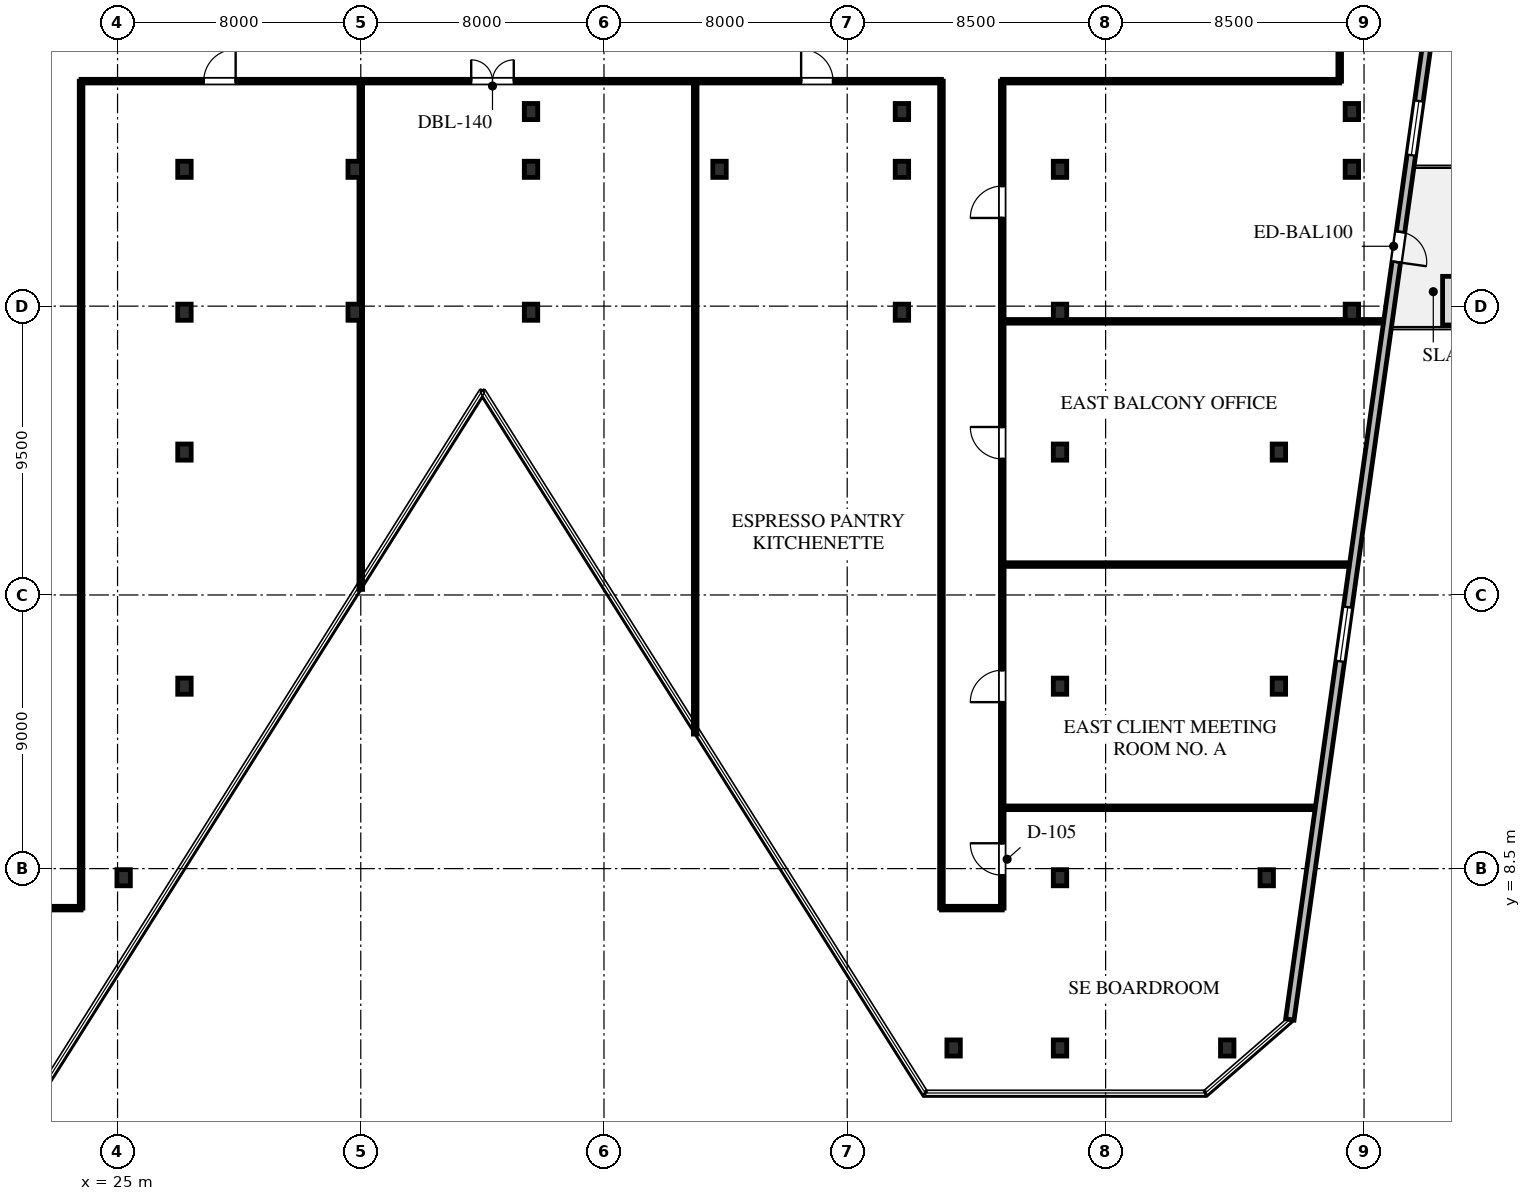
"""IFC4 building model, lengths in metres.
Left out: names, types, materials, properties, quantities, classifications, styles, units other than length and angle.
Written with IfcOpenShell. Run it as: python <this file> out.ifc"""

import sys

from ifc_helpers import new_model, si_unit, direction, frame, frame_2d, origin, origin_2d, place, context, subcontext, project, spatial, rectangle, i_section, extrude, element, fill, save


model = new_model("IFC4")
c1 = context("Model", 3, precision=1e-05, world=origin(), true_north=direction((0.0, 1.0)))
c2 = subcontext(c1, "Body", "Model", "MODEL_VIEW")
j1 = project(units=[si_unit("LENGTHUNIT", "METRE"), si_unit("PLANEANGLEUNIT", "RADIAN")], contexts=[c1])
p1 = place(None, origin())
s1 = spatial("IfcSite", under=j1, at=p1, CompositionType="ELEMENT")
p2 = place(p1, origin())
s2 = spatial("IfcBuilding", under=s1, at=p2, CompositionType="ELEMENT")
p3 = place(p2, frame((0.0, 0.0, 37.5)))
s3 = spatial("IfcBuildingStorey", under=s2, at=p3, CompositionType="ELEMENT", Elevation=37.5)
for number, where, z_axis, x_axis in (
    (1, (56.0, 14.5, 0.0), (0.0, 0.0, 1.0), (1.0, 0.0, 0.0)),
    (2, (63.2, 14.5, 0.0), (0.0, 0.0, 1.0), (1.0, 0.0, 0.0)),
    (3, (27.2, 22.2, 0.0), (0.0, 0.0, 1.0), (1.0, 0.0, 0.0)),
    (4, (56.0, 22.2, 0.0), (0.0, 0.0, 1.0), (1.0, 0.0, 0.0)),
    (5, (63.2, 22.2, 0.0), (0.0, 0.0, 1.0), (1.0, 0.0, 0.0)),
    (6, (27.2, 26.8, 0.0), (0.0, 0.0, 1.0), (1.0, 0.0, 0.0)),
    (7, (32.8, 26.8, 0.0), (0.0, 0.0, 1.0), (1.0, 0.0, 0.0)),
    (8, (38.6, 26.8, 0.0), (0.0, 0.0, 1.0), (1.0, 0.0, 0.0)),
    (9, (50.8, 26.8, 0.0), (0.0, 0.0, 1.0), (1.0, 0.0, 0.0)),
    (10, (56.0, 26.8, 0.0), (0.0, 0.0, 1.0), (1.0, 0.0, 0.0)),
    (11, (65.6, 26.8, 0.0), (0.0, 0.0, 1.0), (1.0, 0.0, 0.0)),
    (12, (27.2, 31.5, 0.0), (0.0, 0.0, 1.0), (1.0, 0.0, 0.0)),
    (13, (32.8, 31.5, 0.0), (0.0, 0.0, 1.0), (1.0, 0.0, 0.0)),
    (14, (38.6, 31.5, 0.0), (0.0, 0.0, 1.0), (1.0, 0.0, 0.0)),
    (15, (44.8, 31.5, 0.0), (0.0, 0.0, 1.0), (1.0, 0.0, 0.0)),
    (16, (50.8, 31.5, 0.0), (0.0, 0.0, 1.0), (1.0, 0.0, 0.0)),
    (17, (56.0, 31.5, 0.0), (0.0, 0.0, 1.0), (1.0, 0.0, 0.0)),
    (18, (65.6, 31.5, 0.0), (0.0, 0.0, 1.0), (1.0, 0.0, 0.0)),
    (19, (52.5, 2.6, 0.0), (0.0, 0.0, 1.0), (1.0, 0.0, 0.0)),
    (20, (56.0, 2.6, 0.0), (0.0, 0.0, 1.0), (1.0, 0.0, 0.0)),
    (21, (61.5, 2.6, 0.0), (0.0, 0.0, 1.0), (1.0, 0.0, 0.0)),
    (22, (25.2, 8.2, 0.0), (0.0, 0.0, 1.0), (1.0, 0.0, 0.0)),
    (23, (56.0, 8.2, 0.0), (0.0, 0.0, 1.0), (1.0, 0.0, 0.0)),
    (24, (62.8, 8.2, 0.0), (0.0, 0.0, 1.0), (1.0, 0.0, 0.0)),
    (25, (27.2, 14.5, 0.0), (0.0, 0.0, 1.0), (1.0, 0.0, 0.0)),
    (26, (38.6, 33.4, 0.0), (0.0, 0.0, 1.0), (1.0, 0.0, 0.0)),
    (27, (50.8, 33.4, 0.0), (0.0, 0.0, 1.0), (1.0, 0.0, 0.0)),
    (28, (65.6, 33.4, 0.0), (0.0, 0.0, 1.0), (1.0, 0.0, 0.0)),
):
    element("IfcColumn", number, at=place(p3, frame(where, z_axis=z_axis, x_axis=x_axis)), inside=s3, PredefinedType="COLUMN", context=c2, shape_type="SweptSolid", body=[
        extrude(i_section(OverallWidth=0.442, OverallDepth=0.531, WebThickness=0.066, FlangeThickness=0.106, FilletRadius=0.03, at=origin_2d()), origin(), (0.0, 0.0, 1.0), 4.0),
    ])
p4 = place(p3, frame((68.375, 37.8, 0.0), z_axis=(0.0, 0.0, 1.0), x_axis=(-0.139174610616, -0.990267856572, 0.0)))
e29 = element("IfcWall", 29, at=p4, inside=s3, PredefinedType="STANDARD", context=c2, shape_type="SweptSolid", body=[
    extrude(rectangle(XDim=34.6, YDim=0.28, at=frame_2d((17.3, 0.0))), origin(), (0.0, 0.0, 1.0), 3.74),
])
p5 = place(p4, frame((8.44, 0.0, 0.0)))
e30 = element("IfcOpeningElement", 30, at=p5, cuts=e29, PredefinedType="OPENING", context=c2, shape_type="SweptSolid", body=[
    extrude(rectangle(XDim=1.0, YDim=2.15, at=frame_2d((0.5, 1.075))), frame((0.0, 0.15, 0.0), z_axis=(0.0, -1.0, 0.0), x_axis=(1.0, 0.0, 0.0)), (0.0, 0.0, 1.0), 0.3),
])
p6 = place(p4, frame((4.092, 0.0, 0.65)))
e31 = element("IfcOpeningElement", 31, at=p6, cuts=e29, PredefinedType="OPENING", context=c2, shape_type="SweptSolid", body=[
    extrude(rectangle(XDim=1.8, YDim=2.1, at=frame_2d((0.9, 1.05))), frame((0.0, 0.15, 0.0), z_axis=(0.0, -1.0, 0.0), x_axis=(1.0, 0.0, 0.0)), (0.0, 0.0, 1.0), 0.3),
])
p7 = place(p4, frame((20.903, 0.0, 0.65)))
e32 = element("IfcOpeningElement", 32, at=p7, cuts=e29, PredefinedType="OPENING", context=c2, shape_type="SweptSolid", body=[
    extrude(rectangle(XDim=1.8, YDim=2.1, at=frame_2d((0.9, 1.05))), frame((0.0, 0.15, 0.0), z_axis=(0.0, -1.0, 0.0), x_axis=(1.0, 0.0, 0.0)), (0.0, 0.0, 1.0), 0.3),
])
p8 = place(p3, frame((23.8, 34.4, 0.0), z_axis=(0.0, 0.0, 1.0), x_axis=(1.0, 0.0, 0.0)))
e33 = element("IfcWall", 33, at=p8, inside=s3, PredefinedType="PARTITIONING", context=c2, shape_type="SweptSolid", body=[
    extrude(rectangle(XDim=28.3, YDim=0.12, at=frame_2d((14.15, 0.0))), origin(), (0.0, 0.0, 1.0), 2.813),
])
p9 = place(p8, frame((4.035, 0.0, 0.0)))
e34 = element("IfcOpeningElement", 34, at=p9, cuts=e33, PredefinedType="OPENING", context=c2, shape_type="SweptSolid", body=[
    extrude(rectangle(XDim=1.05, YDim=2.2, at=frame_2d((0.525, 1.1))), frame((0.0, 0.07, 0.0), z_axis=(0.0, -1.0, 0.0), x_axis=(1.0, 0.0, 0.0)), (0.0, 0.0, 1.0), 0.14),
])
p10 = place(p8, frame((12.832, 0.0, 0.0)))
e35 = element("IfcOpeningElement", 35, at=p10, cuts=e33, PredefinedType="OPENING", context=c2, shape_type="SweptSolid", body=[
    extrude(rectangle(XDim=1.4, YDim=2.2, at=frame_2d((0.7, 1.1))), frame((0.0, 0.07, 0.0), z_axis=(0.0, -1.0, 0.0), x_axis=(1.0, 0.0, 0.0)), (0.0, 0.0, 1.0), 0.14),
])
p11 = place(p8, frame((23.685, 0.0, 0.0)))
e36 = element("IfcOpeningElement", 36, at=p11, cuts=e33, PredefinedType="OPENING", context=c2, shape_type="SweptSolid", body=[
    extrude(rectangle(XDim=1.05, YDim=2.2, at=frame_2d((0.525, 1.1))), frame((0.0, 0.07, 0.0), z_axis=(0.0, -1.0, 0.0), x_axis=(1.0, 0.0, 0.0)), (0.0, 0.0, 1.0), 0.14),
])
p12 = place(p3, frame((54.1, 34.4, 0.0), z_axis=(0.0, 0.0, 1.0), x_axis=(1.0, 0.0, 0.0)))
e37 = element("IfcWall", 37, at=p12, inside=s3, PredefinedType="PARTITIONING", context=c2, shape_type="SweptSolid", body=[
    extrude(rectangle(XDim=11.1, YDim=0.12, at=frame_2d((5.55, 0.0))), origin(), (0.0, 0.0, 1.0), 2.813),
])
p13 = place(p3, frame((65.2, 34.4, 0.0), z_axis=(0.0, 0.0, 1.0), x_axis=(0.0, 1.0, 0.0)))
e38 = element("IfcWall", 38, at=p13, inside=s3, PredefinedType="PARTITIONING", context=c2, shape_type="SweptSolid", body=[
    extrude(rectangle(XDim=3.217, YDim=0.12, at=frame_2d((1.608, 0.0))), origin(), (0.0, 0.0, 1.0), 2.813),
])
p14 = place(p3, frame((23.8, 7.2, 0.0), z_axis=(0.0, 0.0, 1.0), x_axis=(0.0, 1.0, 0.0)))
e39 = element("IfcWall", 39, at=p14, inside=s3, PredefinedType="PARTITIONING", context=c2, shape_type="SweptSolid", body=[
    extrude(rectangle(XDim=27.2, YDim=0.12, at=frame_2d((13.6, 0.0))), origin(), (0.0, 0.0, 1.0), 2.813),
])
p15 = place(p3, frame((21.8, 7.2, 0.0), z_axis=(0.0, 0.0, 1.0), x_axis=(1.0, 0.0, 0.0)))
e40 = element("IfcWall", 40, at=p15, inside=s3, PredefinedType="PARTITIONING", context=c2, shape_type="SweptSolid", body=[
    extrude(rectangle(XDim=2.0, YDim=0.12, at=frame_2d((1.0, 0.0))), origin(), (0.0, 0.0, 1.0), 2.978),
])
p16 = place(p3, frame((52.1, 7.2, 0.0), z_axis=(0.0, 0.0, 1.0), x_axis=(0.0, 1.0, 0.0)))
e41 = element("IfcWall", 41, at=p16, inside=s3, PredefinedType="PARTITIONING", context=c2, shape_type="SweptSolid", body=[
    extrude(rectangle(XDim=27.2, YDim=0.12, at=frame_2d((13.6, 0.0))), origin(), (0.0, 0.0, 1.0), 2.813),
])
p17 = place(p3, frame((54.1, 7.2, 0.0), z_axis=(0.0, 0.0, 1.0), x_axis=(0.0, 1.0, 0.0)))
e42 = element("IfcWall", 42, at=p17, inside=s3, PredefinedType="PARTITIONING", context=c2, shape_type="SweptSolid", body=[
    extrude(rectangle(XDim=27.2, YDim=0.12, at=frame_2d((13.6, 0.0))), origin(), (0.0, 0.0, 1.0), 2.813),
])
p18 = place(p17, frame((1.084, 0.0, 0.0)))
e43 = element("IfcOpeningElement", 43, at=p18, cuts=e42, PredefinedType="OPENING", context=c2, shape_type="SweptSolid", body=[
    extrude(rectangle(XDim=1.05, YDim=2.2, at=frame_2d((0.525, 1.1))), frame((0.0, 0.07, 0.0), z_axis=(0.0, -1.0, 0.0), x_axis=(1.0, 0.0, 0.0)), (0.0, 0.0, 1.0), 0.14),
])
p19 = place(p17, frame((6.775, 0.0, 0.0)))
e44 = element("IfcOpeningElement", 44, at=p19, cuts=e42, PredefinedType="OPENING", context=c2, shape_type="SweptSolid", body=[
    extrude(rectangle(XDim=1.05, YDim=2.2, at=frame_2d((0.525, 1.1))), frame((0.0, 0.07, 0.0), z_axis=(0.0, -1.0, 0.0), x_axis=(1.0, 0.0, 0.0)), (0.0, 0.0, 1.0), 0.14),
])
p20 = place(p17, frame((14.775, 0.0, 0.0)))
e45 = element("IfcOpeningElement", 45, at=p20, cuts=e42, PredefinedType="OPENING", context=c2, shape_type="SweptSolid", body=[
    extrude(rectangle(XDim=1.05, YDim=2.2, at=frame_2d((0.525, 1.1))), frame((0.0, 0.07, 0.0), z_axis=(0.0, -1.0, 0.0), x_axis=(1.0, 0.0, 0.0)), (0.0, 0.0, 1.0), 0.14),
])
p21 = place(p17, frame((22.7, 0.0, 0.0)))
e46 = element("IfcOpeningElement", 46, at=p21, cuts=e42, PredefinedType="OPENING", context=c2, shape_type="SweptSolid", body=[
    extrude(rectangle(XDim=1.05, YDim=2.2, at=frame_2d((0.525, 1.1))), frame((0.0, 0.07, 0.0), z_axis=(0.0, -1.0, 0.0), x_axis=(1.0, 0.0, 0.0)), (0.0, 0.0, 1.0), 0.14),
])
p22 = place(p3, frame((52.1, 7.2, 0.0), z_axis=(0.0, 0.0, 1.0), x_axis=(1.0, 0.0, 0.0)))
e47 = element("IfcWall", 47, at=p22, inside=s3, PredefinedType="PARTITIONING", context=c2, shape_type="SweptSolid", body=[
    extrude(rectangle(XDim=2.0, YDim=0.12, at=frame_2d((1.0, 0.0))), origin(), (0.0, 0.0, 1.0), 2.978),
])
p23 = place(p3, frame((54.168, 10.5, 0.0), z_axis=(0.0, 0.0, 1.0), x_axis=(1.0, 0.0, 0.0)))
e48 = element("IfcWall", 48, at=p23, inside=s3, PredefinedType="PARTITIONING", context=c2, shape_type="SweptSolid", body=[
    extrude(rectangle(XDim=10.204, YDim=0.12, at=frame_2d((5.102, 0.0))), origin(), (0.0, 0.0, 1.0), 2.813),
])
p24 = place(p3, frame((54.168, 18.5, 0.0), z_axis=(0.0, 0.0, 1.0), x_axis=(1.0, 0.0, 0.0)))
e49 = element("IfcWall", 49, at=p24, inside=s3, PredefinedType="PARTITIONING", context=c2, shape_type="SweptSolid", body=[
    extrude(rectangle(XDim=11.328, YDim=0.12, at=frame_2d((5.664, 0.0))), origin(), (0.0, 0.0, 1.0), 2.813),
])
p25 = place(p3, frame((54.168, 26.5, 0.0), z_axis=(0.0, 0.0, 1.0), x_axis=(1.0, 0.0, 0.0)))
e50 = element("IfcWall", 50, at=p25, inside=s3, PredefinedType="PARTITIONING", context=c2, shape_type="SweptSolid", body=[
    extrude(rectangle(XDim=12.452, YDim=0.12, at=frame_2d((6.226, 0.0))), origin(), (0.0, 0.0, 1.0), 2.813),
])
p26 = place(p3, frame((33.0, 17.683, 0.0), z_axis=(0.0, 0.0, 1.0), x_axis=(0.0, 1.0, 0.0)))
e51 = element("IfcWall", 51, at=p26, inside=s3, PredefinedType="PARTITIONING", context=c2, shape_type="SweptSolid", body=[
    extrude(rectangle(XDim=16.649, YDim=0.12, at=frame_2d((8.324, 0.0))), origin(), (0.0, 0.0, 1.0), 2.813),
])
p27 = place(p3, frame((44.0, 12.925, 0.0), z_axis=(0.0, 0.0, 1.0), x_axis=(0.0, 1.0, 0.0)))
e52 = element("IfcWall", 52, at=p27, inside=s3, PredefinedType="PARTITIONING", context=c2, shape_type="SweptSolid", body=[
    extrude(rectangle(XDim=21.407, YDim=0.12, at=frame_2d((10.704, 0.0))), origin(), (0.0, 0.0, 1.0), 2.813),
])
p28 = place(p5, origin())
e53 = element("IfcDoor", 53, at=p28, inside=s3, OperationType="SINGLE_SWING_RIGHT", PredefinedType="DOOR", context=c2, shape_type="SweptSolid", body=[
    extrude(rectangle(XDim=1.0, YDim=2.15, at=frame_2d((0.5, 1.075))), frame((0.0, 0.025, 0.0), z_axis=(0.0, -1.0, 0.0), x_axis=(1.0, 0.0, 0.0)), (0.0, 0.0, 1.0), 0.05),
])
fill(e30, e53)
p29 = place(p6, origin())
e54 = element("IfcWindow", 54, at=p29, inside=s3, PartitioningType="SINGLE_PANEL", PredefinedType="WINDOW", context=c2, shape_type="SweptSolid", body=[
    extrude(rectangle(XDim=1.8, YDim=2.1, at=frame_2d((0.9, 1.05))), frame((0.0, 0.03, 0.0), z_axis=(0.0, -1.0, 0.0), x_axis=(1.0, 0.0, 0.0)), (0.0, 0.0, 1.0), 0.06),
])
fill(e31, e54)
p30 = place(p7, origin())
e55 = element("IfcWindow", 55, at=p30, inside=s3, PartitioningType="SINGLE_PANEL", PredefinedType="WINDOW", context=c2, shape_type="SweptSolid", body=[
    extrude(rectangle(XDim=1.8, YDim=2.1, at=frame_2d((0.9, 1.05))), frame((0.0, 0.03, 0.0), z_axis=(0.0, -1.0, 0.0), x_axis=(1.0, 0.0, 0.0)), (0.0, 0.0, 1.0), 0.06),
])
fill(e32, e55)
p31 = place(p18, origin())
e56 = element("IfcDoor", 56, at=p31, inside=s3, OperationType="SINGLE_SWING_RIGHT", PredefinedType="DOOR", context=c2, shape_type="SweptSolid", body=[
    extrude(rectangle(XDim=1.05, YDim=2.2, at=frame_2d((0.525, 1.1))), frame((0.0, 0.025, 0.0), z_axis=(0.0, -1.0, 0.0), x_axis=(1.0, 0.0, 0.0)), (0.0, 0.0, 1.0), 0.05),
])
fill(e43, e56)
p32 = place(p19, origin())
e57 = element("IfcDoor", 57, at=p32, inside=s3, OperationType="SINGLE_SWING_LEFT", PredefinedType="DOOR", context=c2, shape_type="SweptSolid", body=[
    extrude(rectangle(XDim=1.05, YDim=2.2, at=frame_2d((0.525, 1.1))), frame((0.0, 0.025, 0.0), z_axis=(0.0, -1.0, 0.0), x_axis=(1.0, 0.0, 0.0)), (0.0, 0.0, 1.0), 0.05),
])
fill(e44, e57)
p33 = place(p20, origin())
e58 = element("IfcDoor", 58, at=p33, inside=s3, OperationType="SINGLE_SWING_RIGHT", PredefinedType="DOOR", context=c2, shape_type="SweptSolid", body=[
    extrude(rectangle(XDim=1.05, YDim=2.2, at=frame_2d((0.525, 1.1))), frame((0.0, 0.025, 0.0), z_axis=(0.0, -1.0, 0.0), x_axis=(1.0, 0.0, 0.0)), (0.0, 0.0, 1.0), 0.05),
])
fill(e45, e58)
p34 = place(p21, origin())
e59 = element("IfcDoor", 59, at=p34, inside=s3, OperationType="SINGLE_SWING_LEFT", PredefinedType="DOOR", context=c2, shape_type="SweptSolid", body=[
    extrude(rectangle(XDim=1.05, YDim=2.2, at=frame_2d((0.525, 1.1))), frame((0.0, 0.025, 0.0), z_axis=(0.0, -1.0, 0.0), x_axis=(1.0, 0.0, 0.0)), (0.0, 0.0, 1.0), 0.05),
])
fill(e46, e59)
p35 = place(p9, origin())
e60 = element("IfcDoor", 60, at=p35, inside=s3, OperationType="SINGLE_SWING_RIGHT", PredefinedType="DOOR", context=c2, shape_type="SweptSolid", body=[
    extrude(rectangle(XDim=1.05, YDim=2.2, at=frame_2d((0.525, 1.1))), frame((0.0, 0.025, 0.0), z_axis=(0.0, -1.0, 0.0), x_axis=(1.0, 0.0, 0.0)), (0.0, 0.0, 1.0), 0.05),
])
fill(e34, e60)
p36 = place(p10, origin())
e61 = element("IfcDoor", 61, at=p36, inside=s3, OperationType="DOUBLE_DOOR_SINGLE_SWING", PredefinedType="DOOR", context=c2, shape_type="SweptSolid", body=[
    extrude(rectangle(XDim=1.4, YDim=2.2, at=frame_2d((0.7, 1.1))), frame((0.0, 0.025, 0.0), z_axis=(0.0, -1.0, 0.0), x_axis=(1.0, 0.0, 0.0)), (0.0, 0.0, 1.0), 0.05),
])
fill(e35, e61)
p37 = place(p11, origin())
e62 = element("IfcDoor", 62, at=p37, inside=s3, OperationType="SINGLE_SWING_LEFT", PredefinedType="DOOR", context=c2, shape_type="SweptSolid", body=[
    extrude(rectangle(XDim=1.05, YDim=2.2, at=frame_2d((0.525, 1.1))), frame((0.0, 0.025, 0.0), z_axis=(0.0, -1.0, 0.0), x_axis=(1.0, 0.0, 0.0)), (0.0, 0.0, 1.0), 0.05),
])
fill(e36, e62)
save(model, sys.argv[1])
